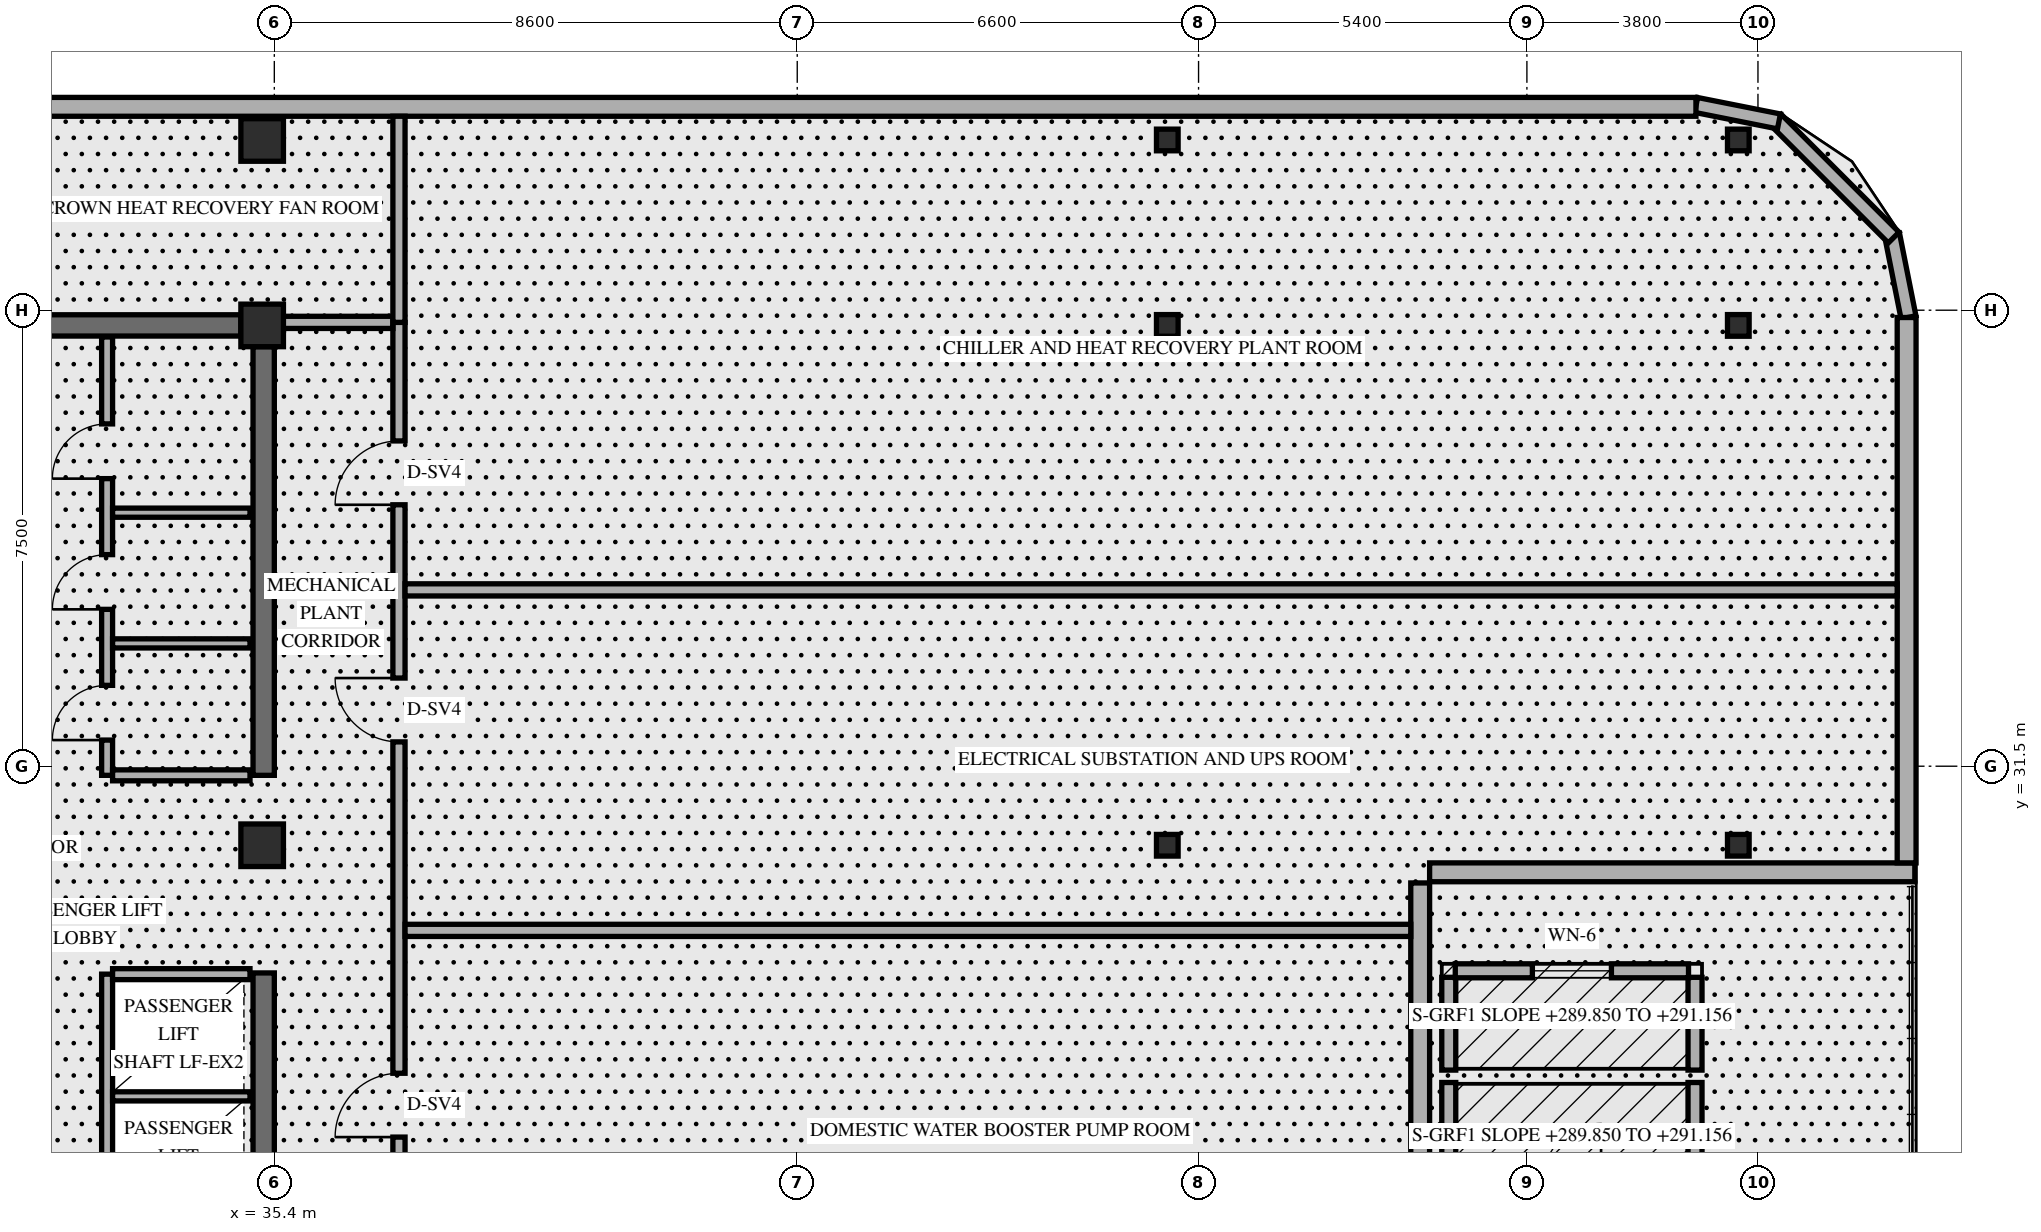
"""IFC4 building model, lengths in metres.
Left out: names, types, materials, properties, quantities, classifications, styles, units other than length and angle.
Written with IfcOpenShell. Run it as: python <this file> out.ifc"""

import sys

from ifc_helpers import new_model, si_unit, direction, frame, frame_2d, origin, origin_2d, place, context, subcontext, project, spatial, rectangle, hollow_rectangle, extrude, element, fill, save


model = new_model("IFC4")
c1 = context("Model", 3, precision=1e-05, world=origin(), true_north=direction((0.0, 1.0)))
c2 = subcontext(c1, "Body", "Model", "MODEL_VIEW")
j1 = project(units=[si_unit("LENGTHUNIT", "METRE"), si_unit("PLANEANGLEUNIT", "RADIAN")], contexts=[c1])
p1 = place(None, origin())
s1 = spatial("IfcSite", under=j1, at=p1, CompositionType="ELEMENT")
p2 = place(p1, origin())
s2 = spatial("IfcBuilding", under=s1, at=p2, CompositionType="ELEMENT")
p3 = place(p2, frame((0.0, 0.0, 287.0)))
s3 = spatial("IfcBuildingStorey", under=s2, at=p3, CompositionType="ELEMENT", Elevation=287.0)
p4 = place(p3, frame((35.225, 17.9, 0.0), z_axis=(0.0, 0.0, 1.0), x_axis=(0.0, 1.0, 0.0)))
e1 = element("IfcWall", 1, at=p4, inside=s3, PredefinedType="SHEAR", context=c2, shape_type="SweptSolid", body=[
    extrude(rectangle(XDim=10.2, YDim=0.35, at=frame_2d((5.1, 0.0))), origin(), (0.0, 0.0, 1.0), 5.161),
])
p5 = place(p3, frame((35.225, 31.35, 0.0), z_axis=(0.0, 0.0, 1.0), x_axis=(0.0, 1.0, 0.0)))
e2 = element("IfcWall", 2, at=p5, inside=s3, PredefinedType="SHEAR", context=c2, shape_type="SweptSolid", body=[
    extrude(rectangle(XDim=7.05, YDim=0.35, at=frame_2d((3.525, 0.0))), origin(), (0.0, 0.0, 1.0), 5.161),
])
p6 = place(p3, frame((24.55, 38.75, 0.0), z_axis=(0.0, 0.0, 1.0), x_axis=(1.0, 0.0, 0.0)))
e3 = element("IfcWall", 3, at=p6, inside=s3, PredefinedType="SHEAR", context=c2, shape_type="SweptSolid", body=[
    extrude(rectangle(XDim=10.3, YDim=0.35, at=frame_2d((5.15, 0.0))), origin(), (0.0, 0.0, 1.0), 5.7),
])
p7 = place(p6, frame((4.5, 0.0, 0.0)))
e4 = element("IfcOpeningElement", 4, at=p7, cuts=e3, PredefinedType="OPENING", context=c2, shape_type="SweptSolid", body=[
    extrude(rectangle(XDim=1.0, YDim=2.15, at=frame_2d((0.5, 1.075))), frame((0.0, 0.185, 0.0), z_axis=(0.0, -1.0, 0.0), x_axis=(1.0, 0.0, 0.0)), (0.0, 0.0, 1.0), 0.37),
])
for number, where, z_axis, x_axis in (
    (5, (35.2, 30.2, 0.0), (0.0, 0.0, 1.0), (1.0, 0.0, 0.0)),
    (6, (35.2, 38.75, 0.0), (0.0, 0.0, 1.0), (1.0, 0.0, 0.0)),
    (7, (35.2, 41.8, 0.0), (0.0, 0.0, 1.0), (1.0, 0.0, 0.0)),
):
    element("IfcColumn", number, at=place(p3, frame(where, z_axis=z_axis, x_axis=x_axis)), inside=s3, PredefinedType="COLUMN", context=c2, shape_type="SweptSolid", body=[
        extrude(rectangle(XDim=0.7, YDim=0.7, at=origin_2d()), origin(), (0.0, 0.0, 1.0), 5.996),
    ])
for number, where, z_axis, x_axis in (
    (8, (49.981, 30.2, 0.0), (0.035, 0.0, 0.999), (0.0, 1.0, 0.0)),
    (9, (49.981, 38.75, 0.0), (0.035, 0.0, 0.999), (0.0, 1.0, 0.0)),
    (10, (49.981, 41.8, 0.0), (0.035, 0.0, 0.999), (0.0, 1.0, 0.0)),
):
    element("IfcColumn", number, at=place(p3, frame(where, z_axis=z_axis, x_axis=x_axis)), inside=s3, PredefinedType="COLUMN", context=c2, shape_type="SweptSolid", body=[
        extrude(hollow_rectangle(XDim=0.356, YDim=0.356, WallThickness=0.016, at=origin_2d()), origin(), (0.0, 0.0, 1.0), 6.0),
    ])
for number, where, z_axis, x_axis in (
    (11, (59.303, 30.2, 0.0), (0.058, 0.0, 0.998), (0.0, 1.0, 0.0)),
    (12, (59.303, 38.75, 0.0), (0.058, 0.0, 0.998), (0.0, 1.0, 0.0)),
    (13, (59.303, 41.8, 0.0), (0.058, 0.0, 0.998), (0.0, 1.0, 0.0)),
):
    element("IfcColumn", number, at=place(p3, frame(where, z_axis=z_axis, x_axis=x_axis)), inside=s3, PredefinedType="COLUMN", context=c2, shape_type="SweptSolid", body=[
        extrude(hollow_rectangle(XDim=0.356, YDim=0.356, WallThickness=0.016, at=origin_2d()), origin(), (0.0, 0.0, 1.0), 6.006),
    ])
p8 = place(p3, frame((62.276, 38.884, 0.0), z_axis=(0.0, 0.0, 1.0), x_axis=(-0.195135625965, 0.9807762678, 0.0)))
e14 = element("IfcWall", 14, at=p8, inside=s3, PredefinedType="SOLIDWALL", context=c2, shape_type="SweptSolid", body=[
    extrude(rectangle(XDim=1.389, YDim=0.25, at=frame_2d((0.694, 0.0))), origin(), (0.0, 0.0, 1.0), 5.7),
])
p9 = place(p3, frame((62.032, 40.195, 0.0), z_axis=(0.0, 0.0, 1.0), x_axis=(-0.707106781187, 0.707106781187, 0.0)))
e15 = element("IfcWall", 15, at=p9, inside=s3, PredefinedType="SOLIDWALL", context=c2, shape_type="SweptSolid", body=[
    extrude(rectangle(XDim=2.739, YDim=0.25, at=frame_2d((1.37, 0.0))), origin(), (0.0, 0.0, 1.0), 5.7),
])
p10 = place(p3, frame((60.146, 42.105, 0.0), z_axis=(0.0, 0.0, 1.0), x_axis=(-0.980809899341, 0.19496651342, 0.0)))
e16 = element("IfcWall", 16, at=p10, inside=s3, PredefinedType="SOLIDWALL", context=c2, shape_type="SweptSolid", body=[
    extrude(rectangle(XDim=1.389, YDim=0.25, at=frame_2d((0.694, 0.0))), origin(), (0.0, 0.0, 1.0), 5.7),
])
p11 = place(p3, frame((54.4, 29.755, 0.0), z_axis=(0.0, 0.0, 1.0), x_axis=(1.0, 0.0, 0.0)))
e17 = element("IfcWall", 17, at=p11, inside=s3, PredefinedType="SOLIDWALL", context=c2, shape_type="SweptSolid", body=[
    extrude(rectangle(XDim=7.98, YDim=0.31, at=frame_2d((3.99, 0.0))), origin(), (0.0, 0.0, 1.0), 5.219),
])
p12 = place(p3, frame((54.245, 18.22, 0.0), z_axis=(0.0, 0.0, 1.0), x_axis=(0.0, 1.0, 0.0)))
e18 = element("IfcWall", 18, at=p12, inside=s3, PredefinedType="SOLIDWALL", context=c2, shape_type="SweptSolid", body=[
    extrude(rectangle(XDim=11.36, YDim=0.31, at=frame_2d((5.68, 0.0))), origin(), (0.0, 0.0, 1.0), 5.7),
])
p13 = place(p12, frame((5.16, 0.0, 0.0)))
e19 = element("IfcOpeningElement", 19, at=p13, cuts=e18, PredefinedType="OPENING", context=c2, shape_type="SweptSolid", body=[
    extrude(rectangle(XDim=1.05, YDim=2.15, at=frame_2d((0.525, 1.075))), frame((0.0, 0.165, 0.0), z_axis=(0.0, -1.0, 0.0), x_axis=(1.0, 0.0, 0.0)), (0.0, 0.0, 1.0), 0.33),
])
p14 = place(p3, frame((62.245, 29.91, 0.0), z_axis=(0.0, 0.0, 1.0), x_axis=(0.0, 1.0, 0.0)))
e20 = element("IfcWall", 20, at=p14, inside=s3, PredefinedType="SOLIDWALL", context=c2, shape_type="SweptSolid", body=[
    extrude(rectangle(XDim=8.97, YDim=0.31, at=frame_2d((4.485, 0.0))), origin(), (0.0, 0.0, 1.0), 5.7),
])
p15 = place(p3, frame((58.78, 42.345, 0.0), z_axis=(0.0, 0.0, 1.0), x_axis=(-1.0, 0.0, 0.0)))
e21 = element("IfcWall", 21, at=p15, inside=s3, PredefinedType="SOLIDWALL", context=c2, shape_type="SweptSolid", body=[
    extrude(rectangle(XDim=32.96, YDim=0.31, at=frame_2d((16.48, 0.0))), origin(), (0.0, 0.0, 1.0), 5.7),
])
for number, where, z_axis, x_axis in (
    (22, (54.715, 24.772, 0.0), (0.0, 0.0, 1.0), (0.0, 1.0, 0.0)),
    (23, (54.715, 26.502, 0.0), (0.0, 0.0, 1.0), (0.0, 1.0, 0.0)),
    (24, (58.765, 24.772, 0.0), (0.0, 0.0, 1.0), (0.0, 1.0, 0.0)),
    (25, (58.765, 26.502, 0.0), (0.0, 0.0, 1.0), (0.0, 1.0, 0.0)),
):
    element("IfcWall", number, at=place(p3, frame(where, z_axis=z_axis, x_axis=x_axis)), inside=s3, PredefinedType="SOLIDWALL", context=c2, shape_type="SweptSolid", body=[
        extrude(rectangle(XDim=1.526, YDim=0.23, at=frame_2d((0.763, 0.0))), origin(), (0.0, 0.0, 1.0), 2.264),
    ])
p16 = place(p3, frame((54.822, 28.135, 0.0), z_axis=(0.0, 0.0, 1.0), x_axis=(1.0, 0.0, 0.0)))
e26 = element("IfcWall", 26, at=p16, inside=s3, PredefinedType="SOLIDWALL", context=c2, shape_type="SweptSolid", body=[
    extrude(rectangle(XDim=3.836, YDim=0.23, at=frame_2d((1.918, 0.0))), origin(), (0.0, 0.0, 1.0), 2.264),
])
p17 = place(p16, frame((1.268, 0.0, 0.78)))
e27 = element("IfcOpeningElement", 27, at=p17, cuts=e26, PredefinedType="OPENING", context=c2, shape_type="SweptSolid", body=[
    extrude(rectangle(XDim=1.3, YDim=1.25, at=frame_2d((0.65, 0.625))), frame((0.0, 0.125, 0.0), z_axis=(0.0, -1.0, 0.0), x_axis=(1.0, 0.0, 0.0)), (0.0, 0.0, 1.0), 0.25),
])
p18 = place(p3, frame((32.65, 18.02, 0.0), z_axis=(0.0, 0.0, 1.0), x_axis=(0.0, 1.0, 0.0)))
e28 = element("IfcWall", 28, at=p18, inside=s3, PredefinedType="STANDARD", context=c2, shape_type="SweptSolid", body=[
    extrude(rectangle(XDim=10.06, YDim=0.18, at=frame_2d((5.03, 0.0))), origin(), (0.0, 0.0, 1.0), 5.7),
])
p19 = place(p18, frame((0.56, 0.0, 0.0)))
e29 = element("IfcOpeningElement", 29, at=p19, cuts=e28, PredefinedType="OPENING", context=c2, shape_type="SweptSolid", body=[
    extrude(rectangle(XDim=0.9, YDim=2.1, at=frame_2d((0.45, 1.05))), frame((0.0, 0.1, 0.0), z_axis=(0.0, -1.0, 0.0), x_axis=(1.0, 0.0, 0.0)), (0.0, 0.0, 1.0), 0.2),
])
p20 = place(p18, frame((2.56, 0.0, 0.0)))
e30 = element("IfcOpeningElement", 30, at=p20, cuts=e28, PredefinedType="OPENING", context=c2, shape_type="SweptSolid", body=[
    extrude(rectangle(XDim=0.9, YDim=2.1, at=frame_2d((0.45, 1.05))), frame((0.0, 0.1, 0.0), z_axis=(0.0, -1.0, 0.0), x_axis=(1.0, 0.0, 0.0)), (0.0, 0.0, 1.0), 0.2),
])
p21 = place(p18, frame((4.56, 0.0, 0.0)))
e31 = element("IfcOpeningElement", 31, at=p21, cuts=e28, PredefinedType="OPENING", context=c2, shape_type="SweptSolid", body=[
    extrude(rectangle(XDim=0.9, YDim=2.1, at=frame_2d((0.45, 1.05))), frame((0.0, 0.1, 0.0), z_axis=(0.0, -1.0, 0.0), x_axis=(1.0, 0.0, 0.0)), (0.0, 0.0, 1.0), 0.2),
])
p22 = place(p3, frame((32.74, 28.08, 0.0), z_axis=(0.0, 0.0, 1.0), x_axis=(1.0, 0.0, 0.0)))
e32 = element("IfcWall", 32, at=p22, inside=s3, PredefinedType="STANDARD", context=c2, shape_type="SweptSolid", body=[
    extrude(rectangle(XDim=2.26, YDim=0.18, at=frame_2d((1.13, 0.0))), origin(), (0.0, 0.0, 1.0), 5.7),
])
p23 = place(p3, frame((32.74, 26.07, 0.0), z_axis=(0.0, 0.0, 1.0), x_axis=(1.0, 0.0, 0.0)))
e33 = element("IfcWall", 33, at=p23, inside=s3, PredefinedType="STANDARD", context=c2, shape_type="SweptSolid", body=[
    extrude(rectangle(XDim=2.26, YDim=0.15, at=frame_2d((1.13, 0.0))), origin(), (0.0, 0.0, 1.0), 5.7),
])
p24 = place(p3, frame((32.65, 31.35, 0.0), z_axis=(0.0, 0.0, 1.0), x_axis=(0.0, 1.0, 0.0)))
e34 = element("IfcWall", 34, at=p24, inside=s3, PredefinedType="STANDARD", context=c2, shape_type="SweptSolid", body=[
    extrude(rectangle(XDim=7.21, YDim=0.18, at=frame_2d((3.605, 0.0))), origin(), (0.0, 0.0, 1.0), 5.7),
])
p25 = place(p24, frame((0.58, 0.0, 0.0)))
e35 = element("IfcOpeningElement", 35, at=p25, cuts=e34, PredefinedType="OPENING", context=c2, shape_type="SweptSolid", body=[
    extrude(rectangle(XDim=0.9, YDim=2.1, at=frame_2d((0.45, 1.05))), frame((0.0, 0.1, 0.0), z_axis=(0.0, -1.0, 0.0), x_axis=(1.0, 0.0, 0.0)), (0.0, 0.0, 1.0), 0.2),
])
p26 = place(p24, frame((2.73, 0.0, 0.0)))
e36 = element("IfcOpeningElement", 36, at=p26, cuts=e34, PredefinedType="OPENING", context=c2, shape_type="SweptSolid", body=[
    extrude(rectangle(XDim=0.9, YDim=2.1, at=frame_2d((0.45, 1.05))), frame((0.0, 0.1, 0.0), z_axis=(0.0, -1.0, 0.0), x_axis=(1.0, 0.0, 0.0)), (0.0, 0.0, 1.0), 0.2),
])
p27 = place(p24, frame((4.88, 0.0, 0.0)))
e37 = element("IfcOpeningElement", 37, at=p27, cuts=e34, PredefinedType="OPENING", context=c2, shape_type="SweptSolid", body=[
    extrude(rectangle(XDim=0.9, YDim=2.1, at=frame_2d((0.45, 1.05))), frame((0.0, 0.1, 0.0), z_axis=(0.0, -1.0, 0.0), x_axis=(1.0, 0.0, 0.0)), (0.0, 0.0, 1.0), 0.2),
])
p28 = place(p3, frame((32.74, 31.35, 0.0), z_axis=(0.0, 0.0, 1.0), x_axis=(1.0, 0.0, 0.0)))
e38 = element("IfcWall", 38, at=p28, inside=s3, PredefinedType="STANDARD", context=c2, shape_type="SweptSolid", body=[
    extrude(rectangle(XDim=2.26, YDim=0.18, at=frame_2d((1.13, 0.0))), origin(), (0.0, 0.0, 1.0), 5.7),
])
for number, where, z_axis, x_axis in (
    (39, (32.74, 33.52, 0.0), (0.0, 0.0, 1.0), (1.0, 0.0, 0.0)),
    (40, (32.74, 35.67, 0.0), (0.0, 0.0, 1.0), (1.0, 0.0, 0.0)),
):
    element("IfcWall", number, at=place(p3, frame(where, z_axis=z_axis, x_axis=x_axis)), inside=s3, PredefinedType="STANDARD", context=c2, shape_type="SweptSolid", body=[
        extrude(rectangle(XDim=2.26, YDim=0.15, at=frame_2d((1.13, 0.0))), origin(), (0.0, 0.0, 1.0), 5.7),
    ])
p29 = place(p3, frame((37.45, 13.8, 0.0), z_axis=(0.0, 0.0, 1.0), x_axis=(0.0, 1.0, 0.0)))
e41 = element("IfcWall", 41, at=p29, inside=s3, PredefinedType="STANDARD", context=c2, shape_type="SweptSolid", body=[
    extrude(rectangle(XDim=25.0, YDim=0.2, at=frame_2d((12.5, 0.0))), origin(), (0.0, 0.0, 1.0), 5.143),
])
p30 = place(p29, frame((6.6, 0.0, 0.0)))
e42 = element("IfcOpeningElement", 42, at=p30, cuts=e41, PredefinedType="OPENING", context=c2, shape_type="SweptSolid", body=[
    extrude(rectangle(XDim=1.05, YDim=2.15, at=frame_2d((0.525, 1.075))), frame((0.0, 0.11, 0.0), z_axis=(0.0, -1.0, 0.0), x_axis=(1.0, 0.0, 0.0)), (0.0, 0.0, 1.0), 0.22),
])
p31 = place(p29, frame((0.6, 0.0, 0.0)))
e43 = element("IfcOpeningElement", 43, at=p31, cuts=e41, PredefinedType="OPENING", context=c2, shape_type="SweptSolid", body=[
    extrude(rectangle(XDim=1.0, YDim=2.15, at=frame_2d((0.5, 1.075))), frame((0.0, 0.11, 0.0), z_axis=(0.0, -1.0, 0.0), x_axis=(1.0, 0.0, 0.0)), (0.0, 0.0, 1.0), 0.22),
])
p32 = place(p29, frame((11.6, 0.0, 0.0)))
e44 = element("IfcOpeningElement", 44, at=p32, cuts=e41, PredefinedType="OPENING", context=c2, shape_type="SweptSolid", body=[
    extrude(rectangle(XDim=1.05, YDim=2.15, at=frame_2d((0.525, 1.075))), frame((0.0, 0.11, 0.0), z_axis=(0.0, -1.0, 0.0), x_axis=(1.0, 0.0, 0.0)), (0.0, 0.0, 1.0), 0.22),
])
p33 = place(p29, frame((18.1, 0.0, 0.0)))
e45 = element("IfcOpeningElement", 45, at=p33, cuts=e41, PredefinedType="OPENING", context=c2, shape_type="SweptSolid", body=[
    extrude(rectangle(XDim=1.05, YDim=2.15, at=frame_2d((0.525, 1.075))), frame((0.0, 0.11, 0.0), z_axis=(0.0, -1.0, 0.0), x_axis=(1.0, 0.0, 0.0)), (0.0, 0.0, 1.0), 0.22),
])
p34 = place(p29, frame((22.0, 0.0, 0.0)))
e46 = element("IfcOpeningElement", 46, at=p34, cuts=e41, PredefinedType="OPENING", context=c2, shape_type="SweptSolid", body=[
    extrude(rectangle(XDim=1.05, YDim=2.15, at=frame_2d((0.525, 1.075))), frame((0.0, 0.11, 0.0), z_axis=(0.0, -1.0, 0.0), x_axis=(1.0, 0.0, 0.0)), (0.0, 0.0, 1.0), 0.22),
])
p35 = place(p3, frame((35.42, 38.8, 0.0), z_axis=(0.0, 0.0, 1.0), x_axis=(1.0, 0.0, 0.0)))
e47 = element("IfcWall", 47, at=p35, inside=s3, PredefinedType="STANDARD", context=c2, shape_type="SweptSolid", body=[
    extrude(rectangle(XDim=1.93, YDim=0.2, at=frame_2d((0.965, 0.0))), origin(), (0.0, 0.0, 1.0), 5.143),
])
p36 = place(p3, frame((37.55, 28.8, 0.0), z_axis=(0.0, 0.0, 1.0), x_axis=(1.0, 0.0, 0.0)))
e48 = element("IfcWall", 48, at=p36, inside=s3, PredefinedType="STANDARD", context=c2, shape_type="SweptSolid", body=[
    extrude(rectangle(XDim=16.54, YDim=0.2, at=frame_2d((8.27, 0.0))), origin(), (0.0, 0.0, 1.0), 5.143),
])
p37 = place(p3, frame((37.55, 34.4, 0.0), z_axis=(0.0, 0.0, 1.0), x_axis=(1.0, 0.0, 0.0)))
e49 = element("IfcWall", 49, at=p37, inside=s3, PredefinedType="STANDARD", context=c2, shape_type="SweptSolid", body=[
    extrude(rectangle(XDim=24.54, YDim=0.2, at=frame_2d((12.27, 0.0))), origin(), (0.0, 0.0, 1.0), 5.143),
])
p38 = place(p3, frame((37.45, 38.8, 0.0), z_axis=(0.0, 0.0, 1.0), x_axis=(0.0, 1.0, 0.0)))
e50 = element("IfcWall", 50, at=p38, inside=s3, PredefinedType="STANDARD", context=c2, shape_type="SweptSolid", body=[
    extrude(rectangle(XDim=3.39, YDim=0.2, at=frame_2d((1.695, 0.0))), origin(), (0.0, 0.0, 1.0), 5.143),
])
p39 = place(p17, origin())
e51 = element("IfcWindow", 51, at=p39, inside=s3, PartitioningType="SINGLE_PANEL", PredefinedType="WINDOW", context=c2, shape_type="SweptSolid", body=[
    extrude(rectangle(XDim=1.3, YDim=1.25, at=frame_2d((0.65, 0.625))), frame((0.0, 0.03, 0.0), z_axis=(0.0, -1.0, 0.0), x_axis=(1.0, 0.0, 0.0)), (0.0, 0.0, 1.0), 0.06),
])
fill(e27, e51)
p40 = place(p25, origin())
e52 = element("IfcDoor", 52, at=p40, inside=s3, OperationType="SINGLE_SWING_LEFT", PredefinedType="DOOR", context=c2, shape_type="SweptSolid", body=[
    extrude(rectangle(XDim=0.9, YDim=2.1, at=frame_2d((0.45, 1.05))), frame((0.0, 0.025, 0.0), z_axis=(0.0, -1.0, 0.0), x_axis=(1.0, 0.0, 0.0)), (0.0, 0.0, 1.0), 0.05),
])
fill(e35, e52)
p41 = place(p26, origin())
e53 = element("IfcDoor", 53, at=p41, inside=s3, OperationType="SINGLE_SWING_LEFT", PredefinedType="DOOR", context=c2, shape_type="SweptSolid", body=[
    extrude(rectangle(XDim=0.9, YDim=2.1, at=frame_2d((0.45, 1.05))), frame((0.0, 0.025, 0.0), z_axis=(0.0, -1.0, 0.0), x_axis=(1.0, 0.0, 0.0)), (0.0, 0.0, 1.0), 0.05),
])
fill(e36, e53)
p42 = place(p27, origin())
e54 = element("IfcDoor", 54, at=p42, inside=s3, OperationType="SINGLE_SWING_LEFT", PredefinedType="DOOR", context=c2, shape_type="SweptSolid", body=[
    extrude(rectangle(XDim=0.9, YDim=2.1, at=frame_2d((0.45, 1.05))), frame((0.0, 0.025, 0.0), z_axis=(0.0, -1.0, 0.0), x_axis=(1.0, 0.0, 0.0)), (0.0, 0.0, 1.0), 0.05),
])
fill(e37, e54)
p43 = place(p32, origin())
e55 = element("IfcDoor", 55, at=p43, inside=s3, OperationType="SINGLE_SWING_LEFT", PredefinedType="DOOR", context=c2, shape_type="SweptSolid", body=[
    extrude(rectangle(XDim=1.05, YDim=2.15, at=frame_2d((0.525, 1.075))), frame((0.0, 0.025, 0.0), z_axis=(0.0, -1.0, 0.0), x_axis=(1.0, 0.0, 0.0)), (0.0, 0.0, 1.0), 0.05),
])
fill(e44, e55)
p44 = place(p33, origin())
e56 = element("IfcDoor", 56, at=p44, inside=s3, OperationType="SINGLE_SWING_RIGHT", PredefinedType="DOOR", context=c2, shape_type="SweptSolid", body=[
    extrude(rectangle(XDim=1.05, YDim=2.15, at=frame_2d((0.525, 1.075))), frame((0.0, 0.025, 0.0), z_axis=(0.0, -1.0, 0.0), x_axis=(1.0, 0.0, 0.0)), (0.0, 0.0, 1.0), 0.05),
])
fill(e45, e56)
p45 = place(p34, origin())
e57 = element("IfcDoor", 57, at=p45, inside=s3, OperationType="SINGLE_SWING_LEFT", PredefinedType="DOOR", context=c2, shape_type="SweptSolid", body=[
    extrude(rectangle(XDim=1.05, YDim=2.15, at=frame_2d((0.525, 1.075))), frame((0.0, 0.025, 0.0), z_axis=(0.0, -1.0, 0.0), x_axis=(1.0, 0.0, 0.0)), (0.0, 0.0, 1.0), 0.05),
])
fill(e46, e57)
save(model, sys.argv[1])
